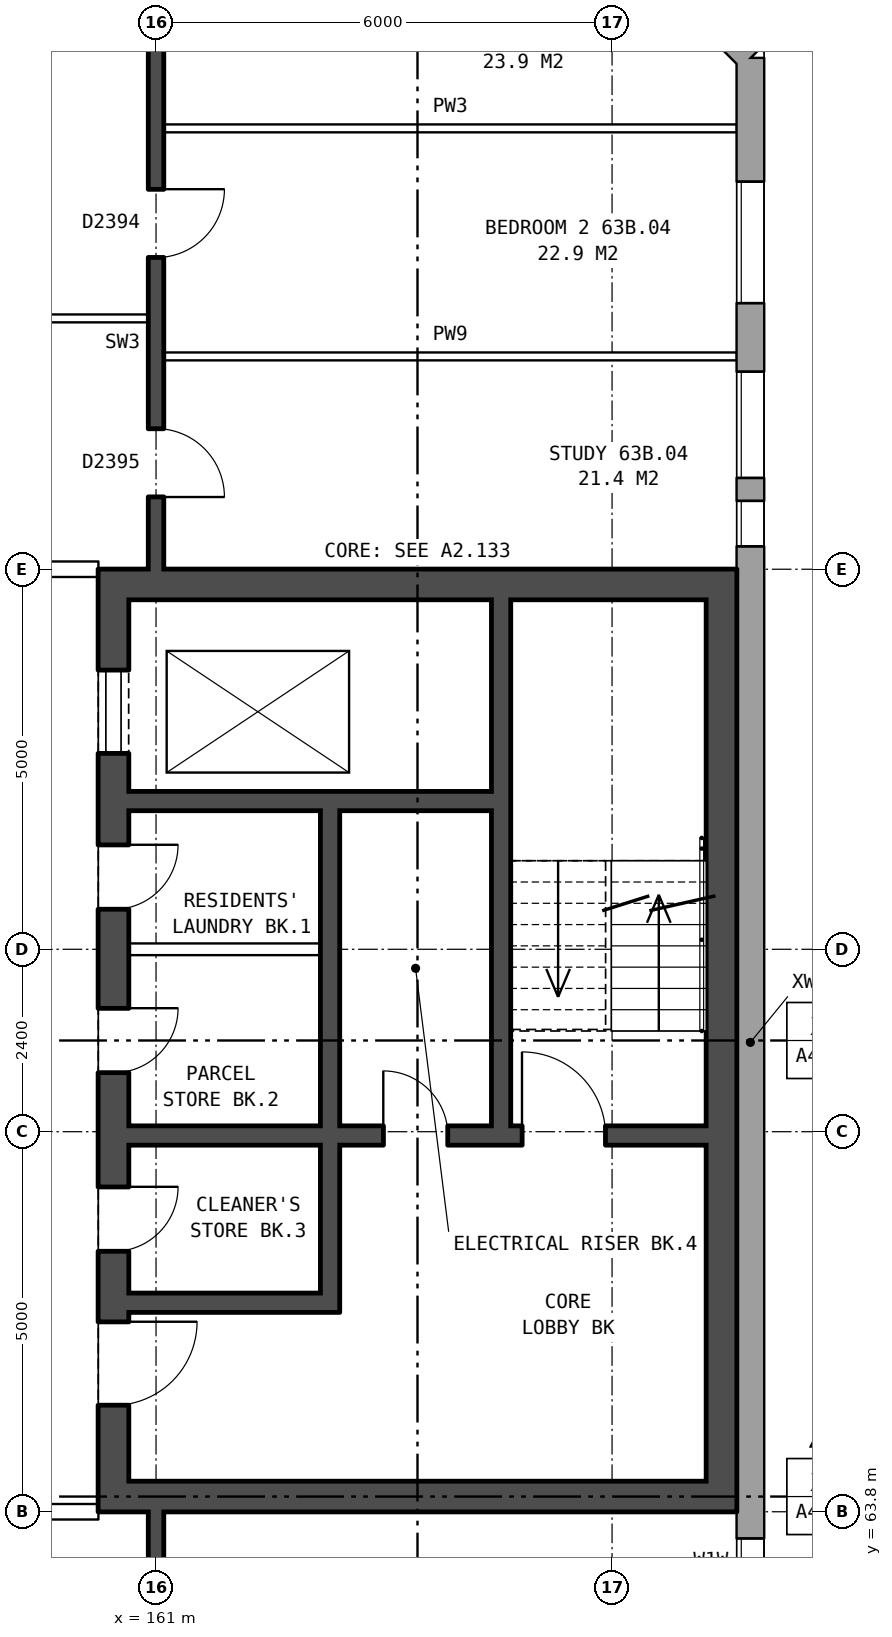
"""IFC4 building model, lengths in metres.
Left out: names, types, materials, properties, quantities, classifications, styles, units other than length and angle.
Written with IfcOpenShell. Run it as: python <this file> out.ifc"""

import sys

from ifc_helpers import new_model, si_unit, direction, frame, frame_2d, origin, place, context, subcontext, project, spatial, rectangle, extrude, element, fill, save


model = new_model("IFC4")
c1 = context("Model", 3, precision=1e-05, world=origin(), true_north=direction((0.0, 1.0)))
c2 = subcontext(c1, "Body", "Model", "MODEL_VIEW")
j1 = project(units=[si_unit("LENGTHUNIT", "METRE"), si_unit("PLANEANGLEUNIT", "RADIAN")], contexts=[c1])
p1 = place(None, origin())
s1 = spatial("IfcSite", under=j1, at=p1, CompositionType="ELEMENT")
p2 = place(p1, origin())
s2 = spatial("IfcBuilding", under=s1, at=p2, CompositionType="ELEMENT")
p3 = place(p2, frame((0.0, 0.0, 224.5)))
s3 = spatial("IfcBuildingStorey", under=s2, at=p3, CompositionType="ELEMENT", Elevation=224.5)
p4 = place(p3, frame((168.82, 57.075, 0.0), z_axis=(0.0, 0.0, 1.0), x_axis=(0.0, 1.0, 0.0)))
e1 = element("IfcWall", 1, at=p4, inside=s3, PredefinedType="STANDARD", context=c2, shape_type="SweptSolid", body=[
    extrude(rectangle(XDim=25.851, YDim=0.36, at=frame_2d((12.925, 0.0))), origin(), (0.0, 0.0, 1.0), 2.85),
])
p5 = place(p4, frame((1.625, 0.0, 0.8)))
e2 = element("IfcOpeningElement", 2, at=p5, cuts=e1, PredefinedType="OPENING", context=c2, shape_type="SweptSolid", body=[
    extrude(rectangle(XDim=1.6, YDim=1.8, at=frame_2d((0.8, 0.9))), frame((0.0, 0.19, 0.0), z_axis=(0.0, -1.0, 0.0), x_axis=(1.0, 0.0, 0.0)), (0.0, 0.0, 1.0), 0.38),
])
p6 = place(p4, frame((4.075, 0.0, 0.8)))
e3 = element("IfcOpeningElement", 3, at=p6, cuts=e1, PredefinedType="OPENING", context=c2, shape_type="SweptSolid", body=[
    extrude(rectangle(XDim=1.4, YDim=1.8, at=frame_2d((0.7, 0.9))), frame((0.0, 0.19, 0.0), z_axis=(0.0, -1.0, 0.0), x_axis=(1.0, 0.0, 0.0)), (0.0, 0.0, 1.0), 0.38),
])
p7 = place(p4, frame((19.425, 0.0, 0.8)))
e4 = element("IfcOpeningElement", 4, at=p7, cuts=e1, PredefinedType="OPENING", context=c2, shape_type="SweptSolid", body=[
    extrude(rectangle(XDim=0.6, YDim=0.9, at=frame_2d((0.3, 0.45))), frame((0.0, 0.19, 0.0), z_axis=(0.0, -1.0, 0.0), x_axis=(1.0, 0.0, 0.0)), (0.0, 0.0, 1.0), 0.38),
])
p8 = place(p4, frame((22.625, 0.0, 0.8)))
e5 = element("IfcOpeningElement", 5, at=p8, cuts=e1, PredefinedType="OPENING", context=c2, shape_type="SweptSolid", body=[
    extrude(rectangle(XDim=1.6, YDim=1.8, at=frame_2d((0.8, 0.9))), frame((0.0, 0.19, 0.0), z_axis=(0.0, -1.0, 0.0), x_axis=(1.0, 0.0, 0.0)), (0.0, 0.0, 1.0), 0.38),
])
p9 = place(p4, frame((5.775, 0.0, 0.8)))
e6 = element("IfcOpeningElement", 6, at=p9, cuts=e1, PredefinedType="OPENING", context=c2, shape_type="SweptSolid", body=[
    extrude(rectangle(XDim=0.6, YDim=0.9, at=frame_2d((0.3, 0.45))), frame((0.0, 0.19, 0.0), z_axis=(0.0, -1.0, 0.0), x_axis=(1.0, 0.0, 0.0)), (0.0, 0.0, 1.0), 0.38),
])
p10 = place(p4, frame((20.325, 0.0, 0.8)))
e7 = element("IfcOpeningElement", 7, at=p10, cuts=e1, PredefinedType="OPENING", context=c2, shape_type="SweptSolid", body=[
    extrude(rectangle(XDim=1.4, YDim=1.8, at=frame_2d((0.7, 0.9))), frame((0.0, 0.19, 0.0), z_axis=(0.0, -1.0, 0.0), x_axis=(1.0, 0.0, 0.0)), (0.0, 0.0, 1.0), 0.38),
])
p11 = place(p3, frame((168.82, 82.925, 0.0), z_axis=(0.0, 0.0, 1.0), x_axis=(-0.707106781187, 0.707106781187, 0.0)))
e8 = element("IfcWall", 8, at=p11, inside=s3, PredefinedType="STANDARD", context=c2, shape_type="SweptSolid", body=[
    extrude(rectangle(XDim=4.094, YDim=0.36, at=frame_2d((2.047, 0.0))), origin(), (0.0, 0.0, 1.0), 2.85),
])
p12 = place(p11, frame((1.247, 0.0, 0.8)))
e9 = element("IfcOpeningElement", 9, at=p12, cuts=e8, PredefinedType="OPENING", context=c2, shape_type="SweptSolid", body=[
    extrude(rectangle(XDim=1.6, YDim=1.8, at=frame_2d((0.8, 0.9))), frame((0.0, 0.19, 0.0), z_axis=(0.0, -1.0, 0.0), x_axis=(1.0, 0.0, 0.0)), (0.0, 0.0, 1.0), 0.38),
])
p13 = place(p3, frame((160.44, 76.2, 0.0), z_axis=(0.0, 0.0, 1.0), x_axis=(0.0, -1.0, 0.0)))
e10 = element("IfcWall", 10, at=p13, inside=s3, PredefinedType="SHEAR", context=c2, shape_type="SweptSolid", body=[
    extrude(rectangle(XDim=12.4, YDim=0.4, at=frame_2d((6.2, 0.0))), origin(), (0.0, 0.0, 1.0), 2.85),
])
p14 = place(p13, frame((1.325, 0.0, 0.0)))
e11 = element("IfcOpeningElement", 11, at=p14, cuts=e10, PredefinedType="OPENING", context=c2, shape_type="SweptSolid", body=[
    extrude(rectangle(XDim=1.1, YDim=2.1, at=frame_2d((0.55, 1.05))), frame((0.0, 0.21, 0.0), z_axis=(0.0, -1.0, 0.0), x_axis=(1.0, 0.0, 0.0)), (0.0, 0.0, 1.0), 0.42),
])
p15 = place(p13, frame((3.625, 0.0, 0.0)))
e12 = element("IfcOpeningElement", 12, at=p15, cuts=e10, PredefinedType="OPENING", context=c2, shape_type="SweptSolid", body=[
    extrude(rectangle(XDim=0.85, YDim=2.1, at=frame_2d((0.425, 1.05))), frame((0.0, 0.21, 0.0), z_axis=(0.0, -1.0, 0.0), x_axis=(1.0, 0.0, 0.0)), (0.0, 0.0, 1.0), 0.42),
])
p16 = place(p13, frame((5.775, 0.0, 0.0)))
e13 = element("IfcOpeningElement", 13, at=p16, cuts=e10, PredefinedType="OPENING", context=c2, shape_type="SweptSolid", body=[
    extrude(rectangle(XDim=0.85, YDim=2.1, at=frame_2d((0.425, 1.05))), frame((0.0, 0.21, 0.0), z_axis=(0.0, -1.0, 0.0), x_axis=(1.0, 0.0, 0.0)), (0.0, 0.0, 1.0), 0.42),
])
p17 = place(p13, frame((9.9, 0.0, 0.0)))
e14 = element("IfcOpeningElement", 14, at=p17, cuts=e10, PredefinedType="OPENING", context=c2, shape_type="SweptSolid", body=[
    extrude(rectangle(XDim=1.1, YDim=2.1, at=frame_2d((0.55, 1.05))), frame((0.0, 0.21, 0.0), z_axis=(0.0, -1.0, 0.0), x_axis=(1.0, 0.0, 0.0)), (0.0, 0.0, 1.0), 0.42),
])
p18 = place(p13, frame((8.125, 0.0, 0.0)))
e15 = element("IfcOpeningElement", 15, at=p18, cuts=e10, PredefinedType="OPENING", context=c2, shape_type="SweptSolid", body=[
    extrude(rectangle(XDim=0.85, YDim=2.1, at=frame_2d((0.425, 1.05))), frame((0.0, 0.21, 0.0), z_axis=(0.0, -1.0, 0.0), x_axis=(1.0, 0.0, 0.0)), (0.0, 0.0, 1.0), 0.42),
])
p19 = place(p3, frame((168.44, 76.2, 0.0), z_axis=(0.0, 0.0, 1.0), x_axis=(0.0, -1.0, 0.0)))
e16 = element("IfcWall", 16, at=p19, inside=s3, PredefinedType="SHEAR", context=c2, shape_type="SweptSolid", body=[
    extrude(rectangle(XDim=12.4, YDim=0.4, at=frame_2d((6.2, 0.0))), origin(), (0.0, 0.0, 1.0), 2.85),
])
for number, where, z_axis, x_axis in (
    (17, (160.64, 76.0, 0.0), (0.0, 0.0, 1.0), (1.0, 0.0, 0.0)),
    (18, (160.64, 64.0, 0.0), (0.0, 0.0, 1.0), (1.0, 0.0, 0.0)),
):
    element("IfcWall", number, at=place(p3, frame(where, z_axis=z_axis, x_axis=x_axis)), inside=s3, PredefinedType="SHEAR", context=c2, shape_type="SweptSolid", body=[
        extrude(rectangle(XDim=7.6, YDim=0.4, at=frame_2d((3.8, 0.0))), origin(), (0.0, 0.0, 1.0), 2.85),
    ])
p20 = place(p3, frame((160.64, 73.15, 0.0), z_axis=(0.0, 0.0, 1.0), x_axis=(1.0, 0.0, 0.0)))
e19 = element("IfcWall", 19, at=p20, inside=s3, PredefinedType="SHEAR", context=c2, shape_type="SweptSolid", body=[
    extrude(rectangle(XDim=4.775, YDim=0.25, at=frame_2d((2.388, 0.0))), origin(), (0.0, 0.0, 1.0), 2.85),
])
p21 = place(p3, frame((160.64, 71.2, 0.0), z_axis=(0.0, 0.0, 1.0), x_axis=(1.0, 0.0, 0.0)))
e20 = element("IfcWall", 20, at=p21, inside=s3, PredefinedType="PARTITIONING", context=c2, shape_type="SweptSolid", body=[
    extrude(rectangle(XDim=2.525, YDim=0.15, at=frame_2d((1.263, 0.0))), origin(), (0.0, 0.0, 1.0), 2.85),
])
p22 = place(p3, frame((160.64, 68.75, 0.0), z_axis=(0.0, 0.0, 1.0), x_axis=(1.0, 0.0, 0.0)))
e21 = element("IfcWall", 21, at=p22, inside=s3, PredefinedType="SHEAR", context=c2, shape_type="SweptSolid", body=[
    extrude(rectangle(XDim=7.6, YDim=0.25, at=frame_2d((3.8, 0.0))), origin(), (0.0, 0.0, 1.0), 2.85),
])
p23 = place(p22, frame((5.175, 0.0, 0.0)))
e22 = element("IfcOpeningElement", 22, at=p23, cuts=e21, PredefinedType="OPENING", context=c2, shape_type="SweptSolid", body=[
    extrude(rectangle(XDim=1.1, YDim=2.1, at=frame_2d((0.55, 1.05))), frame((0.0, 0.135, 0.0), z_axis=(0.0, -1.0, 0.0), x_axis=(1.0, 0.0, 0.0)), (0.0, 0.0, 1.0), 0.27),
])
p24 = place(p22, frame((3.35, 0.0, 0.0)))
e23 = element("IfcOpeningElement", 23, at=p24, cuts=e21, PredefinedType="OPENING", context=c2, shape_type="SweptSolid", body=[
    extrude(rectangle(XDim=0.85, YDim=2.1, at=frame_2d((0.425, 1.05))), frame((0.0, 0.135, 0.0), z_axis=(0.0, -1.0, 0.0), x_axis=(1.0, 0.0, 0.0)), (0.0, 0.0, 1.0), 0.27),
])
p25 = place(p3, frame((160.64, 66.55, 0.0), z_axis=(0.0, 0.0, 1.0), x_axis=(1.0, 0.0, 0.0)))
e24 = element("IfcWall", 24, at=p25, inside=s3, PredefinedType="SHEAR", context=c2, shape_type="SweptSolid", body=[
    extrude(rectangle(XDim=2.525, YDim=0.25, at=frame_2d((1.263, 0.0))), origin(), (0.0, 0.0, 1.0), 2.85),
])
p26 = place(p3, frame((163.29, 73.025, 0.0), z_axis=(0.0, 0.0, 1.0), x_axis=(0.0, -1.0, 0.0)))
e25 = element("IfcWall", 25, at=p26, inside=s3, PredefinedType="SHEAR", context=c2, shape_type="SweptSolid", body=[
    extrude(rectangle(XDim=4.15, YDim=0.25, at=frame_2d((2.075, 0.0))), origin(), (0.0, 0.0, 1.0), 2.85),
])
p27 = place(p3, frame((163.29, 68.625, 0.0), z_axis=(0.0, 0.0, 1.0), x_axis=(0.0, -1.0, 0.0)))
e26 = element("IfcWall", 26, at=p27, inside=s3, PredefinedType="SHEAR", context=c2, shape_type="SweptSolid", body=[
    extrude(rectangle(XDim=2.2, YDim=0.25, at=frame_2d((1.1, 0.0))), origin(), (0.0, 0.0, 1.0), 2.85),
])
p28 = place(p3, frame((165.54, 75.8, 0.0), z_axis=(0.0, 0.0, 1.0), x_axis=(0.0, -1.0, 0.0)))
e27 = element("IfcWall", 27, at=p28, inside=s3, PredefinedType="SHEAR", context=c2, shape_type="SweptSolid", body=[
    extrude(rectangle(XDim=6.925, YDim=0.25, at=frame_2d((3.462, 0.0))), origin(), (0.0, 0.0, 1.0), 2.85),
])
p29 = place(p3, frame((157.24, 63.8, 0.0), z_axis=(0.0, 0.0, 1.0), x_axis=(1.0, 0.0, 0.0)))
e28 = element("IfcWall", 28, at=p29, inside=s3, PredefinedType="PARTITIONING", context=c2, shape_type="SweptSolid", body=[
    extrude(rectangle(XDim=3.0, YDim=0.2, at=frame_2d((1.5, 0.0))), origin(), (0.0, 0.0, 1.0), 2.85),
])
p30 = place(p29, frame((1.0, 0.0, 0.0)))
e29 = element("IfcOpeningElement", 29, at=p30, cuts=e28, PredefinedType="OPENING", context=c2, shape_type="SweptSolid", body=[
    extrude(rectangle(XDim=1.0, YDim=2.1, at=frame_2d((0.5, 1.05))), frame((0.0, 0.11, 0.0), z_axis=(0.0, -1.0, 0.0), x_axis=(1.0, 0.0, 0.0)), (0.0, 0.0, 1.0), 0.22),
])
p31 = place(p3, frame((157.24, 76.2, 0.0), z_axis=(0.0, 0.0, 1.0), x_axis=(1.0, 0.0, 0.0)))
e30 = element("IfcWall", 30, at=p31, inside=s3, PredefinedType="PARTITIONING", context=c2, shape_type="SweptSolid", body=[
    extrude(rectangle(XDim=3.0, YDim=0.2, at=frame_2d((1.5, 0.0))), origin(), (0.0, 0.0, 1.0), 2.85),
])
p32 = place(p31, frame((1.0, 0.0, 0.0)))
e31 = element("IfcOpeningElement", 31, at=p32, cuts=e30, PredefinedType="OPENING", context=c2, shape_type="SweptSolid", body=[
    extrude(rectangle(XDim=1.0, YDim=2.1, at=frame_2d((0.5, 1.05))), frame((0.0, 0.11, 0.0), z_axis=(0.0, -1.0, 0.0), x_axis=(1.0, 0.0, 0.0)), (0.0, 0.0, 1.0), 0.22),
])
p33 = place(p3, frame((161.1, 79.0, 0.0), z_axis=(0.0, 0.0, 1.0), x_axis=(1.0, 0.0, 0.0)))
e32 = element("IfcWall", 32, at=p33, inside=s3, PredefinedType="PARTITIONING", context=c2, shape_type="SweptSolid", body=[
    extrude(rectangle(XDim=7.54, YDim=0.1, at=frame_2d((3.77, 0.0))), origin(), (0.0, 0.0, 1.0), 2.85),
])
p34 = place(p3, frame((155.1, 79.5, 0.0), z_axis=(0.0, 0.0, 1.0), x_axis=(1.0, 0.0, 0.0)))
e33 = element("IfcWall", 33, at=p34, inside=s3, PredefinedType="PARTITIONING", context=c2, shape_type="SweptSolid", body=[
    extrude(rectangle(XDim=5.8, YDim=0.1, at=frame_2d((2.9, 0.0))), origin(), (0.0, 0.0, 1.0), 2.85),
])
p35 = place(p34, frame((3.6, 0.0, 0.0)))
e34 = element("IfcOpeningElement", 34, at=p35, cuts=e33, PredefinedType="OPENING", context=c2, shape_type="SweptSolid", body=[
    extrude(rectangle(XDim=0.9, YDim=2.1, at=frame_2d((0.45, 1.05))), frame((0.0, 0.06, 0.0), z_axis=(0.0, -1.0, 0.0), x_axis=(1.0, 0.0, 0.0)), (0.0, 0.0, 1.0), 0.12),
])
p36 = place(p34, frame((0.7, 0.0, 0.0)))
e35 = element("IfcOpeningElement", 35, at=p36, cuts=e33, PredefinedType="OPENING", context=c2, shape_type="SweptSolid", body=[
    extrude(rectangle(XDim=0.9, YDim=2.1, at=frame_2d((0.45, 1.05))), frame((0.0, 0.06, 0.0), z_axis=(0.0, -1.0, 0.0), x_axis=(1.0, 0.0, 0.0)), (0.0, 0.0, 1.0), 0.12),
])
p37 = place(p3, frame((161.1, 82.0, 0.0), z_axis=(0.0, 0.0, 1.0), x_axis=(1.0, 0.0, 0.0)))
e36 = element("IfcWall", 36, at=p37, inside=s3, PredefinedType="PARTITIONING", context=c2, shape_type="SweptSolid", body=[
    extrude(rectangle(XDim=7.54, YDim=0.1, at=frame_2d((3.77, 0.0))), origin(), (0.0, 0.0, 1.0), 2.85),
])
p38 = place(p3, frame((161.0, 54.36, 0.0), z_axis=(0.0, 0.0, 1.0), x_axis=(0.0, 1.0, 0.0)))
e37 = element("IfcWall", 37, at=p38, inside=s3, PredefinedType="SOLIDWALL", context=c2, shape_type="SweptSolid", body=[
    extrude(rectangle(XDim=9.44, YDim=0.2, at=frame_2d((4.72, 0.0))), origin(), (0.0, 0.0, 1.0), 2.85),
])
p39 = place(p38, frame((1.37, 0.0, 0.0)))
e38 = element("IfcOpeningElement", 38, at=p39, cuts=e37, PredefinedType="OPENING", context=c2, shape_type="SweptSolid", body=[
    extrude(rectangle(XDim=0.9, YDim=2.1, at=frame_2d((0.45, 1.05))), frame((0.0, 0.11, 0.0), z_axis=(0.0, -1.0, 0.0), x_axis=(1.0, 0.0, 0.0)), (0.0, 0.0, 1.0), 0.22),
])
p40 = place(p38, frame((4.14, 0.0, 0.0)))
e39 = element("IfcOpeningElement", 39, at=p40, cuts=e37, PredefinedType="OPENING", context=c2, shape_type="SweptSolid", body=[
    extrude(rectangle(XDim=0.9, YDim=2.1, at=frame_2d((0.45, 1.05))), frame((0.0, 0.11, 0.0), z_axis=(0.0, -1.0, 0.0), x_axis=(1.0, 0.0, 0.0)), (0.0, 0.0, 1.0), 0.22),
])
p41 = place(p38, frame((7.59, 0.0, 0.0)))
e40 = element("IfcOpeningElement", 40, at=p41, cuts=e37, PredefinedType="OPENING", context=c2, shape_type="SweptSolid", body=[
    extrude(rectangle(XDim=0.9, YDim=2.1, at=frame_2d((0.45, 1.05))), frame((0.0, 0.11, 0.0), z_axis=(0.0, -1.0, 0.0), x_axis=(1.0, 0.0, 0.0)), (0.0, 0.0, 1.0), 0.22),
])
p42 = place(p3, frame((161.0, 76.2, 0.0), z_axis=(0.0, 0.0, 1.0), x_axis=(0.0, 1.0, 0.0)))
e41 = element("IfcWall", 41, at=p42, inside=s3, PredefinedType="SOLIDWALL", context=c2, shape_type="SweptSolid", body=[
    extrude(rectangle(XDim=9.44, YDim=0.2, at=frame_2d((4.72, 0.0))), origin(), (0.0, 0.0, 1.0), 2.85),
])
p43 = place(p42, frame((7.17, 0.0, 0.0)))
e42 = element("IfcOpeningElement", 42, at=p43, cuts=e41, PredefinedType="OPENING", context=c2, shape_type="SweptSolid", body=[
    extrude(rectangle(XDim=0.9, YDim=2.1, at=frame_2d((0.45, 1.05))), frame((0.0, 0.11, 0.0), z_axis=(0.0, -1.0, 0.0), x_axis=(1.0, 0.0, 0.0)), (0.0, 0.0, 1.0), 0.22),
])
p44 = place(p42, frame((4.1, 0.0, 0.0)))
e43 = element("IfcOpeningElement", 43, at=p44, cuts=e41, PredefinedType="OPENING", context=c2, shape_type="SweptSolid", body=[
    extrude(rectangle(XDim=0.9, YDim=2.1, at=frame_2d((0.45, 1.05))), frame((0.0, 0.11, 0.0), z_axis=(0.0, -1.0, 0.0), x_axis=(1.0, 0.0, 0.0)), (0.0, 0.0, 1.0), 0.22),
])
p45 = place(p42, frame((0.95, 0.0, 0.0)))
e44 = element("IfcOpeningElement", 44, at=p45, cuts=e41, PredefinedType="OPENING", context=c2, shape_type="SweptSolid", body=[
    extrude(rectangle(XDim=0.9, YDim=2.1, at=frame_2d((0.45, 1.05))), frame((0.0, 0.11, 0.0), z_axis=(0.0, -1.0, 0.0), x_axis=(1.0, 0.0, 0.0)), (0.0, 0.0, 1.0), 0.22),
])
p46 = place(p7, origin())
e45 = element("IfcWindow", 45, at=p46, inside=s3, PartitioningType="SINGLE_PANEL", PredefinedType="WINDOW", context=c2, shape_type="SweptSolid", body=[
    extrude(rectangle(XDim=0.6, YDim=0.9, at=frame_2d((0.3, 0.45))), frame((0.0, 0.15, 0.0), z_axis=(0.0, -1.0, 0.0), x_axis=(1.0, 0.0, 0.0)), (0.0, 0.0, 1.0), 0.06),
])
fill(e4, e45)
p47 = place(p8, origin())
e46 = element("IfcWindow", 46, at=p47, inside=s3, PartitioningType="SINGLE_PANEL", PredefinedType="WINDOW", context=c2, shape_type="SweptSolid", body=[
    extrude(rectangle(XDim=1.6, YDim=1.8, at=frame_2d((0.8, 0.9))), frame((0.0, 0.15, 0.0), z_axis=(0.0, -1.0, 0.0), x_axis=(1.0, 0.0, 0.0)), (0.0, 0.0, 1.0), 0.06),
])
fill(e5, e46)
p48 = place(p14, origin())
e47 = element("IfcDoor", 47, at=p48, inside=s3, OperationType="DOUBLE_DOOR_SLIDING", PredefinedType="DOOR", context=c2, shape_type="SweptSolid", body=[
    extrude(rectangle(XDim=1.1, YDim=2.1, at=frame_2d((0.55, 1.05))), frame((0.0, 0.185, 0.0), z_axis=(0.0, -1.0, 0.0), x_axis=(1.0, 0.0, 0.0)), (0.0, 0.0, 1.0), 0.05),
])
fill(e11, e47)
p49 = place(p15, origin())
e48 = element("IfcDoor", 48, at=p49, inside=s3, OperationType="SINGLE_SWING_LEFT", PredefinedType="DOOR", context=c2, shape_type="SweptSolid", body=[
    extrude(rectangle(XDim=0.85, YDim=2.1, at=frame_2d((0.425, 1.05))), frame((0.0, 0.185, 0.0), z_axis=(0.0, -1.0, 0.0), x_axis=(1.0, 0.0, 0.0)), (0.0, 0.0, 1.0), 0.05),
])
fill(e12, e48)
p50 = place(p16, origin())
e49 = element("IfcDoor", 49, at=p50, inside=s3, OperationType="SINGLE_SWING_LEFT", PredefinedType="DOOR", context=c2, shape_type="SweptSolid", body=[
    extrude(rectangle(XDim=0.85, YDim=2.1, at=frame_2d((0.425, 1.05))), frame((0.0, 0.185, 0.0), z_axis=(0.0, -1.0, 0.0), x_axis=(1.0, 0.0, 0.0)), (0.0, 0.0, 1.0), 0.05),
])
fill(e13, e49)
p51 = place(p17, origin())
e50 = element("IfcDoor", 50, at=p51, inside=s3, OperationType="SINGLE_SWING_LEFT", PredefinedType="DOOR", context=c2, shape_type="SweptSolid", body=[
    extrude(rectangle(XDim=1.1, YDim=2.1, at=frame_2d((0.55, 1.05))), frame((0.0, 0.185, 0.0), z_axis=(0.0, -1.0, 0.0), x_axis=(1.0, 0.0, 0.0)), (0.0, 0.0, 1.0), 0.05),
])
fill(e14, e50)
p52 = place(p23, origin())
e51 = element("IfcDoor", 51, at=p52, inside=s3, OperationType="SINGLE_SWING_LEFT", PredefinedType="DOOR", context=c2, shape_type="SweptSolid", body=[
    extrude(rectangle(XDim=1.1, YDim=2.1, at=frame_2d((0.55, 1.05))), frame((0.0, 0.025, 0.0), z_axis=(0.0, -1.0, 0.0), x_axis=(1.0, 0.0, 0.0)), (0.0, 0.0, 1.0), 0.05),
])
fill(e22, e51)
p53 = place(p18, origin())
e52 = element("IfcDoor", 52, at=p53, inside=s3, OperationType="SINGLE_SWING_LEFT", PredefinedType="DOOR", context=c2, shape_type="SweptSolid", body=[
    extrude(rectangle(XDim=0.85, YDim=2.1, at=frame_2d((0.425, 1.05))), frame((0.0, 0.185, 0.0), z_axis=(0.0, -1.0, 0.0), x_axis=(1.0, 0.0, 0.0)), (0.0, 0.0, 1.0), 0.05),
])
fill(e15, e52)
p54 = place(p24, origin())
e53 = element("IfcDoor", 53, at=p54, inside=s3, OperationType="SINGLE_SWING_LEFT", PredefinedType="DOOR", context=c2, shape_type="SweptSolid", body=[
    extrude(rectangle(XDim=0.85, YDim=2.1, at=frame_2d((0.425, 1.05))), frame((0.0, 0.025, 0.0), z_axis=(0.0, -1.0, 0.0), x_axis=(1.0, 0.0, 0.0)), (0.0, 0.0, 1.0), 0.05),
])
fill(e23, e53)
p55 = place(p44, frame((0.9, 0.0, 0.0), z_axis=(0.0, 0.0, 1.0), x_axis=(-1.0, 0.0, 0.0)))
e54 = element("IfcDoor", 54, at=p55, inside=s3, OperationType="SINGLE_SWING_LEFT", PredefinedType="DOOR", context=c2, shape_type="SweptSolid", body=[
    extrude(rectangle(XDim=0.9, YDim=2.1, at=frame_2d((0.45, 1.05))), frame((0.0, 0.025, 0.0), z_axis=(0.0, -1.0, 0.0), x_axis=(1.0, 0.0, 0.0)), (0.0, 0.0, 1.0), 0.05),
])
fill(e43, e54)
p56 = place(p45, frame((0.9, 0.0, 0.0), z_axis=(0.0, 0.0, 1.0), x_axis=(-1.0, 0.0, 0.0)))
e55 = element("IfcDoor", 55, at=p56, inside=s3, OperationType="SINGLE_SWING_RIGHT", PredefinedType="DOOR", context=c2, shape_type="SweptSolid", body=[
    extrude(rectangle(XDim=0.9, YDim=2.1, at=frame_2d((0.45, 1.05))), frame((0.0, 0.025, 0.0), z_axis=(0.0, -1.0, 0.0), x_axis=(1.0, 0.0, 0.0)), (0.0, 0.0, 1.0), 0.05),
])
fill(e44, e55)
p57 = place(p9, origin())
e56 = element("IfcWindow", 56, at=p57, inside=s3, PartitioningType="SINGLE_PANEL", PredefinedType="WINDOW", context=c2, shape_type="SweptSolid", body=[
    extrude(rectangle(XDim=0.6, YDim=0.9, at=frame_2d((0.3, 0.45))), frame((0.0, 0.15, 0.0), z_axis=(0.0, -1.0, 0.0), x_axis=(1.0, 0.0, 0.0)), (0.0, 0.0, 1.0), 0.06),
])
fill(e6, e56)
p58 = place(p10, origin())
e57 = element("IfcWindow", 57, at=p58, inside=s3, PartitioningType="SINGLE_PANEL", PredefinedType="WINDOW", context=c2, shape_type="SweptSolid", body=[
    extrude(rectangle(XDim=1.4, YDim=1.8, at=frame_2d((0.7, 0.9))), frame((0.0, 0.15, 0.0), z_axis=(0.0, -1.0, 0.0), x_axis=(1.0, 0.0, 0.0)), (0.0, 0.0, 1.0), 0.06),
])
fill(e7, e57)
save(model, sys.argv[1])
